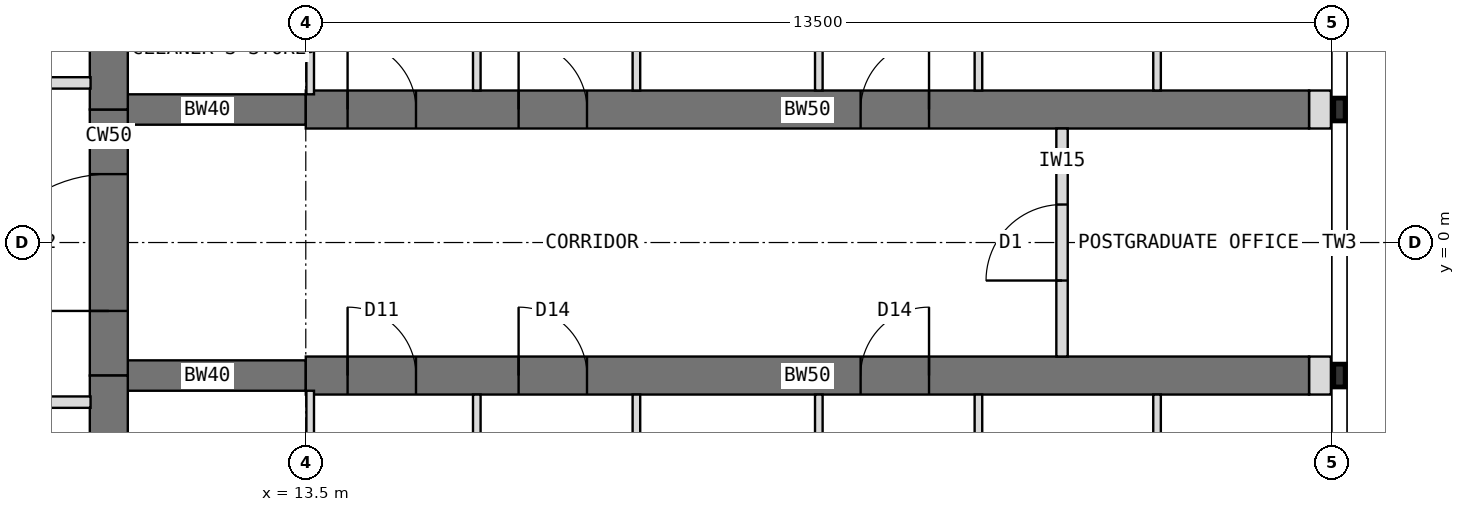
"""IFC4 building model, lengths in metres.
Left out: names, types, materials, properties, quantities, classifications, styles, units other than length and angle.
Written with IfcOpenShell. Run it as: python <this file> out.ifc"""

import sys

from ifc_helpers import new_model, si_unit, direction, frame, frame_2d, origin, place, context, subcontext, project, spatial, rectangle, extrude, element, fill, save


model = new_model("IFC4")
c1 = context("Model", 3, precision=1e-05, world=origin(), true_north=direction((0.0, 1.0)))
c2 = subcontext(c1, "Body", "Model", "MODEL_VIEW")
j1 = project(units=[si_unit("LENGTHUNIT", "METRE"), si_unit("PLANEANGLEUNIT", "RADIAN")], contexts=[c1])
p1 = place(None, origin())
s1 = spatial("IfcSite", under=j1, at=p1, CompositionType="ELEMENT")
p2 = place(p1, origin())
s2 = spatial("IfcBuilding", under=s1, at=p2, CompositionType="ELEMENT")
p3 = place(p2, frame((0.0, 0.0, 230.5)))
s3 = spatial("IfcBuildingStorey", under=s2, at=p3, CompositionType="ELEMENT", Elevation=230.5)
p4 = place(p3, frame((10.908, -6.298, 0.0), z_axis=(0.0, 0.0, 1.0), x_axis=(0.0, 1.0, 0.0)))
e1 = element("IfcWall", 1, at=p4, inside=s3, PredefinedType="SHEAR", context=c2, shape_type="SweptSolid", body=[
    extrude(rectangle(XDim=4.548, YDim=0.5, at=frame_2d((2.274, 0.0))), origin(), (0.0, 0.0, 1.0), 4.0),
])
p5 = place(p3, frame((10.908, -1.75, 0.0), z_axis=(0.0, 0.0, 1.0), x_axis=(0.0, 1.0, 0.0)))
e2 = element("IfcWall", 2, at=p5, inside=s3, PredefinedType="SHEAR", context=c2, shape_type="SweptSolid", body=[
    extrude(rectangle(XDim=3.5, YDim=0.5, at=frame_2d((1.75, 0.0))), origin(), (0.0, 0.0, 1.0), 4.0),
])
p6 = place(p5, frame((0.85, 0.0, 0.0)))
e3 = element("IfcOpeningElement", 3, at=p6, cuts=e2, PredefinedType="OPENING", context=c2, shape_type="SweptSolid", body=[
    extrude(rectangle(XDim=1.8, YDim=2.1, at=frame_2d((0.9, 1.05))), frame((0.0, 0.26, 0.0), z_axis=(0.0, -1.0, 0.0), x_axis=(1.0, 0.0, 0.0)), (0.0, 0.0, 1.0), 0.52),
])
p7 = place(p3, frame((10.908, 1.75, 0.0), z_axis=(0.0, 0.0, 1.0), x_axis=(0.0, 1.0, 0.0)))
e4 = element("IfcWall", 4, at=p7, inside=s3, PredefinedType="SHEAR", context=c2, shape_type="SweptSolid", body=[
    extrude(rectangle(XDim=4.548, YDim=0.5, at=frame_2d((2.274, 0.0))), origin(), (0.0, 0.0, 1.0), 4.0),
])
p8 = place(p3, frame((10.908, 1.75, 0.0), z_axis=(0.0, 0.0, 1.0), x_axis=(1.0, 0.0, 0.0)))
e5 = element("IfcWall", 5, at=p8, inside=s3, PredefinedType="SHEAR", context=c2, shape_type="SweptSolid", body=[
    extrude(rectangle(XDim=2.592, YDim=0.4, at=frame_2d((1.296, 0.0))), origin(), (0.0, 0.0, 1.0), 4.0),
])
p9 = place(p3, frame((13.5, 1.75, 0.0), z_axis=(0.0, 0.0, 1.0), x_axis=(1.0, 0.0, 0.0)))
e6 = element("IfcWall", 6, at=p9, inside=s3, PredefinedType="SHEAR", context=c2, shape_type="SweptSolid", body=[
    extrude(rectangle(XDim=13.2, YDim=0.5, at=frame_2d((6.6, 0.0))), origin(), (0.0, 0.0, 1.0), 4.0),
])
p10 = place(p9, frame((0.55, 0.0, 0.0)))
e7 = element("IfcOpeningElement", 7, at=p10, cuts=e6, PredefinedType="OPENING", context=c2, shape_type="SweptSolid", body=[
    extrude(rectangle(XDim=0.9, YDim=2.1, at=frame_2d((0.45, 1.05))), frame((0.0, 0.26, 0.0), z_axis=(0.0, -1.0, 0.0), x_axis=(1.0, 0.0, 0.0)), (0.0, 0.0, 1.0), 0.52),
])
p11 = place(p9, frame((2.8, 0.0, 0.0)))
e8 = element("IfcOpeningElement", 8, at=p11, cuts=e6, PredefinedType="OPENING", context=c2, shape_type="SweptSolid", body=[
    extrude(rectangle(XDim=0.9, YDim=2.1, at=frame_2d((0.45, 1.05))), frame((0.0, 0.26, 0.0), z_axis=(0.0, -1.0, 0.0), x_axis=(1.0, 0.0, 0.0)), (0.0, 0.0, 1.0), 0.52),
])
p12 = place(p9, frame((7.3, 0.0, 0.0)))
e9 = element("IfcOpeningElement", 9, at=p12, cuts=e6, PredefinedType="OPENING", context=c2, shape_type="SweptSolid", body=[
    extrude(rectangle(XDim=0.9, YDim=2.1, at=frame_2d((0.45, 1.05))), frame((0.0, 0.26, 0.0), z_axis=(0.0, -1.0, 0.0), x_axis=(1.0, 0.0, 0.0)), (0.0, 0.0, 1.0), 0.52),
])
p13 = place(p3, frame((10.908, -1.75, 0.0), z_axis=(0.0, 0.0, 1.0), x_axis=(1.0, 0.0, 0.0)))
e10 = element("IfcWall", 10, at=p13, inside=s3, PredefinedType="SHEAR", context=c2, shape_type="SweptSolid", body=[
    extrude(rectangle(XDim=2.592, YDim=0.4, at=frame_2d((1.296, 0.0))), origin(), (0.0, 0.0, 1.0), 4.0),
])
p14 = place(p3, frame((13.5, -1.75, 0.0), z_axis=(0.0, 0.0, 1.0), x_axis=(1.0, 0.0, 0.0)))
e11 = element("IfcWall", 11, at=p14, inside=s3, PredefinedType="SHEAR", context=c2, shape_type="SweptSolid", body=[
    extrude(rectangle(XDim=13.2, YDim=0.5, at=frame_2d((6.6, 0.0))), origin(), (0.0, 0.0, 1.0), 4.0),
])
p15 = place(p14, frame((0.55, 0.0, 0.0)))
e12 = element("IfcOpeningElement", 12, at=p15, cuts=e11, PredefinedType="OPENING", context=c2, shape_type="SweptSolid", body=[
    extrude(rectangle(XDim=0.9, YDim=2.1, at=frame_2d((0.45, 1.05))), frame((0.0, 0.26, 0.0), z_axis=(0.0, -1.0, 0.0), x_axis=(1.0, 0.0, 0.0)), (0.0, 0.0, 1.0), 0.52),
])
p16 = place(p14, frame((2.8, 0.0, 0.0)))
e13 = element("IfcOpeningElement", 13, at=p16, cuts=e11, PredefinedType="OPENING", context=c2, shape_type="SweptSolid", body=[
    extrude(rectangle(XDim=0.9, YDim=2.1, at=frame_2d((0.45, 1.05))), frame((0.0, 0.26, 0.0), z_axis=(0.0, -1.0, 0.0), x_axis=(1.0, 0.0, 0.0)), (0.0, 0.0, 1.0), 0.52),
])
p17 = place(p14, frame((7.3, 0.0, 0.0)))
e14 = element("IfcOpeningElement", 14, at=p17, cuts=e11, PredefinedType="OPENING", context=c2, shape_type="SweptSolid", body=[
    extrude(rectangle(XDim=0.9, YDim=2.1, at=frame_2d((0.45, 1.05))), frame((0.0, 0.26, 0.0), z_axis=(0.0, -1.0, 0.0), x_axis=(1.0, 0.0, 0.0)), (0.0, 0.0, 1.0), 0.52),
])
for number, where, z_axis, x_axis in (
    (15, (26.7, 1.75, 0.0), (0.0, 0.0, 1.0), (1.0, 0.0, 0.0)),
    (16, (26.7, -1.75, 0.0), (0.0, 0.0, 1.0), (1.0, 0.0, 0.0)),
):
    element("IfcWall", number, at=place(p3, frame(where, z_axis=z_axis, x_axis=x_axis)), inside=s3, PredefinedType="PARTITIONING", context=c2, shape_type="SweptSolid", body=[
        extrude(rectangle(XDim=0.288, YDim=0.5, at=frame_2d((0.144, 0.0))), origin(), (0.0, 0.0, 1.0), 3.8),
    ])
for number, where, z_axis, x_axis in (
    (17, (15.75, 2.0, 0.0), (0.0, 0.0, 1.0), (0.0, 1.0, 0.0)),
    (18, (20.25, 2.0, 0.0), (0.0, 0.0, 1.0), (0.0, 1.0, 0.0)),
):
    element("IfcWall", number, at=place(p3, frame(where, z_axis=z_axis, x_axis=x_axis)), inside=s3, PredefinedType="PARTITIONING", context=c2, shape_type="SweptSolid", body=[
        extrude(rectangle(XDim=4.75, YDim=0.1, at=frame_2d((2.375, 0.0))), origin(), (0.0, 0.0, 1.0), 3.8),
    ])
p18 = place(p3, frame((17.85, 2.0, 0.0), z_axis=(0.0, 0.0, 1.0), x_axis=(0.0, 1.0, 0.0)))
e19 = element("IfcWall", 19, at=p18, inside=s3, PredefinedType="PARTITIONING", context=c2, shape_type="SweptSolid", body=[
    extrude(rectangle(XDim=3.4, YDim=0.1, at=frame_2d((1.7, 0.0))), origin(), (0.0, 0.0, 1.0), 3.8),
])
p19 = place(p18, frame((1.25, 0.0, 0.0)))
e20 = element("IfcOpeningElement", 20, at=p19, cuts=e19, PredefinedType="OPENING", context=c2, shape_type="SweptSolid", body=[
    extrude(rectangle(XDim=0.9, YDim=2.1, at=frame_2d((0.45, 1.05))), frame((0.0, 0.06, 0.0), z_axis=(0.0, -1.0, 0.0), x_axis=(1.0, 0.0, 0.0)), (0.0, 0.0, 1.0), 0.12),
])
p20 = place(p3, frame((22.35, 2.0, 0.0), z_axis=(0.0, 0.0, 1.0), x_axis=(0.0, 1.0, 0.0)))
e21 = element("IfcWall", 21, at=p20, inside=s3, PredefinedType="PARTITIONING", context=c2, shape_type="SweptSolid", body=[
    extrude(rectangle(XDim=3.4, YDim=0.1, at=frame_2d((1.7, 0.0))), origin(), (0.0, 0.0, 1.0), 3.8),
])
p21 = place(p20, frame((1.25, 0.0, 0.0)))
e22 = element("IfcOpeningElement", 22, at=p21, cuts=e21, PredefinedType="OPENING", context=c2, shape_type="SweptSolid", body=[
    extrude(rectangle(XDim=0.9, YDim=2.1, at=frame_2d((0.45, 1.05))), frame((0.0, 0.06, 0.0), z_axis=(0.0, -1.0, 0.0), x_axis=(1.0, 0.0, 0.0)), (0.0, 0.0, 1.0), 0.12),
])
p22 = place(p3, frame((24.7, 2.0, 0.0), z_axis=(0.0, 0.0, 1.0), x_axis=(0.0, 1.0, 0.0)))
e23 = element("IfcWall", 23, at=p22, inside=s3, PredefinedType="PARTITIONING", context=c2, shape_type="SweptSolid", body=[
    extrude(rectangle(XDim=3.4, YDim=0.1, at=frame_2d((1.7, 0.0))), origin(), (0.0, 0.0, 1.0), 3.8),
])
p23 = place(p3, frame((13.558, 1.95, 0.0), z_axis=(0.0, 0.0, 1.0), x_axis=(0.0, 1.0, 0.0)))
e24 = element("IfcWall", 24, at=p23, inside=s3, PredefinedType="PARTITIONING", context=c2, shape_type="SweptSolid", body=[
    extrude(rectangle(XDim=1.2, YDim=0.1, at=frame_2d((0.6, 0.0))), origin(), (0.0, 0.0, 1.0), 3.267),
])
for number, where, z_axis, x_axis in (
    (25, (15.75, -2.0, 0.0), (0.0, 0.0, 1.0), (0.0, -1.0, 0.0)),
    (26, (20.25, -2.0, 0.0), (0.0, 0.0, 1.0), (0.0, -1.0, 0.0)),
):
    element("IfcWall", number, at=place(p3, frame(where, z_axis=z_axis, x_axis=x_axis)), inside=s3, PredefinedType="PARTITIONING", context=c2, shape_type="SweptSolid", body=[
        extrude(rectangle(XDim=4.75, YDim=0.1, at=frame_2d((2.375, 0.0))), origin(), (0.0, 0.0, 1.0), 3.8),
    ])
p24 = place(p3, frame((17.85, -2.0, 0.0), z_axis=(0.0, 0.0, 1.0), x_axis=(0.0, -1.0, 0.0)))
e27 = element("IfcWall", 27, at=p24, inside=s3, PredefinedType="PARTITIONING", context=c2, shape_type="SweptSolid", body=[
    extrude(rectangle(XDim=3.4, YDim=0.1, at=frame_2d((1.7, 0.0))), origin(), (0.0, 0.0, 1.0), 3.8),
])
p25 = place(p24, frame((1.25, 0.0, 0.0)))
e28 = element("IfcOpeningElement", 28, at=p25, cuts=e27, PredefinedType="OPENING", context=c2, shape_type="SweptSolid", body=[
    extrude(rectangle(XDim=0.9, YDim=2.1, at=frame_2d((0.45, 1.05))), frame((0.0, 0.06, 0.0), z_axis=(0.0, -1.0, 0.0), x_axis=(1.0, 0.0, 0.0)), (0.0, 0.0, 1.0), 0.12),
])
p26 = place(p3, frame((22.35, -2.0, 0.0), z_axis=(0.0, 0.0, 1.0), x_axis=(0.0, -1.0, 0.0)))
e29 = element("IfcWall", 29, at=p26, inside=s3, PredefinedType="PARTITIONING", context=c2, shape_type="SweptSolid", body=[
    extrude(rectangle(XDim=3.4, YDim=0.1, at=frame_2d((1.7, 0.0))), origin(), (0.0, 0.0, 1.0), 3.8),
])
p27 = place(p26, frame((1.25, 0.0, 0.0)))
e30 = element("IfcOpeningElement", 30, at=p27, cuts=e29, PredefinedType="OPENING", context=c2, shape_type="SweptSolid", body=[
    extrude(rectangle(XDim=0.9, YDim=2.1, at=frame_2d((0.45, 1.05))), frame((0.0, 0.06, 0.0), z_axis=(0.0, -1.0, 0.0), x_axis=(1.0, 0.0, 0.0)), (0.0, 0.0, 1.0), 0.12),
])
p28 = place(p3, frame((24.7, -2.0, 0.0), z_axis=(0.0, 0.0, 1.0), x_axis=(0.0, -1.0, 0.0)))
e31 = element("IfcWall", 31, at=p28, inside=s3, PredefinedType="PARTITIONING", context=c2, shape_type="SweptSolid", body=[
    extrude(rectangle(XDim=3.4, YDim=0.1, at=frame_2d((1.7, 0.0))), origin(), (0.0, 0.0, 1.0), 3.8),
])
p29 = place(p3, frame((13.558, -1.95, 0.0), z_axis=(0.0, 0.0, 1.0), x_axis=(0.0, -1.0, 0.0)))
e32 = element("IfcWall", 32, at=p29, inside=s3, PredefinedType="PARTITIONING", context=c2, shape_type="SweptSolid", body=[
    extrude(rectangle(XDim=3.2, YDim=0.1, at=frame_2d((1.6, 0.0))), origin(), (0.0, 0.0, 1.0), 3.267),
])
p30 = place(p3, frame((6.143, 2.1, 0.0), z_axis=(0.0, 0.0, 1.0), x_axis=(1.0, 0.0, 0.0)))
e33 = element("IfcWall", 33, at=p30, inside=s3, PredefinedType="PARTITIONING", context=c2, shape_type="SweptSolid", body=[
    extrude(rectangle(XDim=4.526, YDim=0.15, at=frame_2d((2.263, 0.0))), origin(), (0.0, 0.0, 1.0), 3.8),
])
p31 = place(p30, frame((0.858, 0.0, 0.0)))
e34 = element("IfcOpeningElement", 34, at=p31, cuts=e33, PredefinedType="OPENING", context=c2, shape_type="SweptSolid", body=[
    extrude(rectangle(XDim=1.0, YDim=2.1, at=frame_2d((0.5, 1.05))), frame((0.0, 0.085, 0.0), z_axis=(0.0, -1.0, 0.0), x_axis=(1.0, 0.0, 0.0)), (0.0, 0.0, 1.0), 0.17),
])
p32 = place(p3, frame((10.668, -2.1, 0.0), z_axis=(0.0, 0.0, 1.0), x_axis=(-1.0, 0.0, 0.0)))
e35 = element("IfcWall", 35, at=p32, inside=s3, PredefinedType="PARTITIONING", context=c2, shape_type="SweptSolid", body=[
    extrude(rectangle(XDim=4.526, YDim=0.15, at=frame_2d((2.263, 0.0))), origin(), (0.0, 0.0, 1.0), 3.8),
])
p33 = place(p32, frame((2.668, 0.0, 0.0)))
e36 = element("IfcOpeningElement", 36, at=p33, cuts=e35, PredefinedType="OPENING", context=c2, shape_type="SweptSolid", body=[
    extrude(rectangle(XDim=1.0, YDim=2.1, at=frame_2d((0.5, 1.05))), frame((0.0, 0.085, 0.0), z_axis=(0.0, -1.0, 0.0), x_axis=(1.0, 0.0, 0.0)), (0.0, 0.0, 1.0), 0.17),
])
p34 = place(p3, frame((23.45, -1.5, 0.0), z_axis=(0.0, 0.0, 1.0), x_axis=(0.0, 1.0, 0.0)))
e37 = element("IfcWall", 37, at=p34, inside=s3, PredefinedType="PARTITIONING", context=c2, shape_type="SweptSolid", body=[
    extrude(rectangle(XDim=3.0, YDim=0.15, at=frame_2d((1.5, 0.0))), origin(), (0.0, 0.0, 1.0), 3.8),
])
p35 = place(p34, frame((1.0, 0.0, 0.0)))
e38 = element("IfcOpeningElement", 38, at=p35, cuts=e37, PredefinedType="OPENING", context=c2, shape_type="SweptSolid", body=[
    extrude(rectangle(XDim=1.0, YDim=2.1, at=frame_2d((0.5, 1.05))), frame((0.0, 0.085, 0.0), z_axis=(0.0, -1.0, 0.0), x_axis=(1.0, 0.0, 0.0)), (0.0, 0.0, 1.0), 0.17),
])
p36 = place(p6, origin())
e39 = element("IfcDoor", 39, at=p36, inside=s3, OperationType="DOUBLE_DOOR_DOUBLE_SWING", PredefinedType="DOOR", context=c2, shape_type="SweptSolid", body=[
    extrude(rectangle(XDim=1.8, YDim=2.1, at=frame_2d((0.9, 1.05))), frame((0.0, 0.025, 0.0), z_axis=(0.0, -1.0, 0.0), x_axis=(1.0, 0.0, 0.0)), (0.0, 0.0, 1.0), 0.05),
])
fill(e3, e39)
p37 = place(p35, origin())
e40 = element("IfcDoor", 40, at=p37, inside=s3, OperationType="SINGLE_SWING_LEFT", PredefinedType="DOOR", context=c2, shape_type="SweptSolid", body=[
    extrude(rectangle(XDim=1.0, YDim=2.1, at=frame_2d((0.5, 1.05))), frame((0.0, 0.025, 0.0), z_axis=(0.0, -1.0, 0.0), x_axis=(1.0, 0.0, 0.0)), (0.0, 0.0, 1.0), 0.05),
])
fill(e38, e40)
p38 = place(p10, origin())
e41 = element("IfcDoor", 41, at=p38, inside=s3, OperationType="SINGLE_SWING_LEFT", PredefinedType="DOOR", context=c2, shape_type="SweptSolid", body=[
    extrude(rectangle(XDim=0.9, YDim=2.1, at=frame_2d((0.45, 1.05))), frame((0.0, 0.025, 0.0), z_axis=(0.0, -1.0, 0.0), x_axis=(1.0, 0.0, 0.0)), (0.0, 0.0, 1.0), 0.05),
])
fill(e7, e41)
p39 = place(p11, origin())
e42 = element("IfcDoor", 42, at=p39, inside=s3, OperationType="SINGLE_SWING_LEFT", PredefinedType="DOOR", context=c2, shape_type="SweptSolid", body=[
    extrude(rectangle(XDim=0.9, YDim=2.1, at=frame_2d((0.45, 1.05))), frame((0.0, 0.025, 0.0), z_axis=(0.0, -1.0, 0.0), x_axis=(1.0, 0.0, 0.0)), (0.0, 0.0, 1.0), 0.05),
])
fill(e8, e42)
p40 = place(p12, origin())
e43 = element("IfcDoor", 43, at=p40, inside=s3, OperationType="SINGLE_SWING_RIGHT", PredefinedType="DOOR", context=c2, shape_type="SweptSolid", body=[
    extrude(rectangle(XDim=0.9, YDim=2.1, at=frame_2d((0.45, 1.05))), frame((0.0, 0.025, 0.0), z_axis=(0.0, -1.0, 0.0), x_axis=(1.0, 0.0, 0.0)), (0.0, 0.0, 1.0), 0.05),
])
fill(e9, e43)
p41 = place(p15, origin())
e44 = element("IfcDoor", 44, at=p41, inside=s3, OperationType="SINGLE_SWING_LEFT", PredefinedType="DOOR", context=c2, shape_type="SweptSolid", body=[
    extrude(rectangle(XDim=0.9, YDim=2.1, at=frame_2d((0.45, 1.05))), frame((0.0, 0.025, 0.0), z_axis=(0.0, -1.0, 0.0), x_axis=(1.0, 0.0, 0.0)), (0.0, 0.0, 1.0), 0.05),
])
fill(e12, e44)
p42 = place(p16, origin())
e45 = element("IfcDoor", 45, at=p42, inside=s3, OperationType="SINGLE_SWING_LEFT", PredefinedType="DOOR", context=c2, shape_type="SweptSolid", body=[
    extrude(rectangle(XDim=0.9, YDim=2.1, at=frame_2d((0.45, 1.05))), frame((0.0, 0.025, 0.0), z_axis=(0.0, -1.0, 0.0), x_axis=(1.0, 0.0, 0.0)), (0.0, 0.0, 1.0), 0.05),
])
fill(e13, e45)
p43 = place(p17, origin())
e46 = element("IfcDoor", 46, at=p43, inside=s3, OperationType="SINGLE_SWING_RIGHT", PredefinedType="DOOR", context=c2, shape_type="SweptSolid", body=[
    extrude(rectangle(XDim=0.9, YDim=2.1, at=frame_2d((0.45, 1.05))), frame((0.0, 0.025, 0.0), z_axis=(0.0, -1.0, 0.0), x_axis=(1.0, 0.0, 0.0)), (0.0, 0.0, 1.0), 0.05),
])
fill(e14, e46)
save(model, sys.argv[1])
